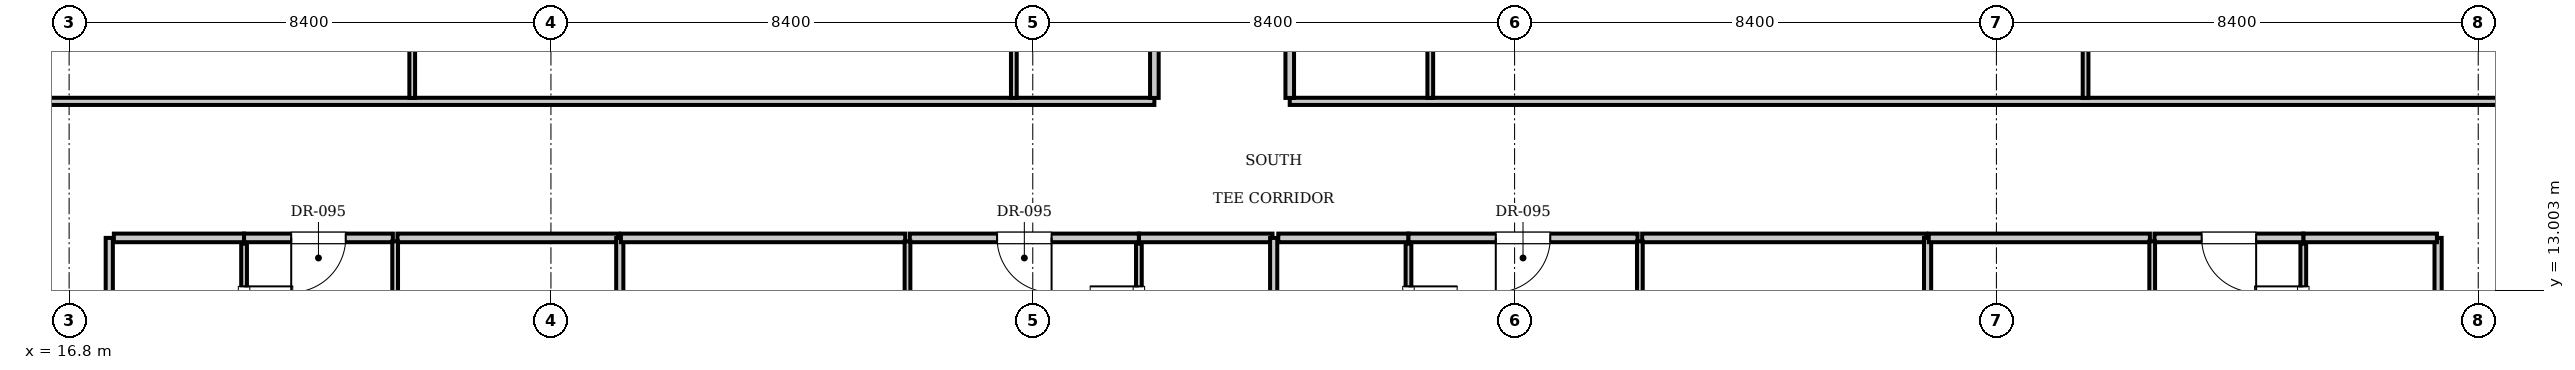
"""IFC4 building model, lengths in metres.
Left out: names, types, materials, properties, quantities, classifications, styles, units other than length and angle.
Written with IfcOpenShell. Run it as: python <this file> out.ifc"""

import sys

from ifc_helpers import new_model, si_unit, direction, frame, frame_2d, origin, place, context, subcontext, project, spatial, rectangle, extrude, element, fill, save


model = new_model("IFC4")
c1 = context("Model", 3, precision=1e-05, world=origin(), true_north=direction((0.0, 1.0)))
c2 = subcontext(c1, "Body", "Model", "MODEL_VIEW")
j1 = project(units=[si_unit("LENGTHUNIT", "METRE"), si_unit("PLANEANGLEUNIT", "RADIAN")], contexts=[c1])
p1 = place(None, origin())
s1 = spatial("IfcSite", under=j1, at=p1, CompositionType="ELEMENT")
p2 = place(p1, origin())
s2 = spatial("IfcBuilding", under=s1, at=p2, CompositionType="ELEMENT")
p3 = place(p2, frame((0.0, 0.0, 189.0)))
s3 = spatial("IfcBuildingStorey", under=s2, at=p3, CompositionType="ELEMENT", Elevation=189.0)
for number, where, z_axis, x_axis in (
    (1, (17.5, 9.0, 0.0), (0.0, 0.0, 1.0), (0.0, 1.0, 0.0)),
    (2, (58.1, 9.0, 0.0), (0.0, 0.0, 1.0), (0.0, 1.0, 0.0)),
):
    element("IfcWall", number, at=place(p3, frame(where, z_axis=z_axis, x_axis=x_axis)), inside=s3, PredefinedType="PARTITIONING", context=c2, shape_type="SweptSolid", body=[
        extrude(rectangle(XDim=4.92, YDim=0.125, at=frame_2d((2.46, 0.0))), origin(), (0.0, 0.0, 1.0), 3.61),
    ])
p4 = place(p3, frame((17.58, 13.92, 0.0), z_axis=(0.0, 0.0, 1.0), x_axis=(1.0, 0.0, 0.0)))
e3 = element("IfcWall", 3, at=p4, inside=s3, PredefinedType="PARTITIONING", context=c2, shape_type="SweptSolid", body=[
    extrude(rectangle(XDim=2.27, YDim=0.15, at=frame_2d((1.135, 0.0))), origin(), (0.0, 0.0, 1.0), 3.61),
])
p5 = place(p3, frame((19.85, 11.48, 0.0), z_axis=(0.0, 0.0, 1.0), x_axis=(0.0, 1.0, 0.0)))
e4 = element("IfcWall", 4, at=p5, inside=s3, PredefinedType="PARTITIONING", context=c2, shape_type="SweptSolid", body=[
    extrude(rectangle(XDim=2.34, YDim=0.1, at=frame_2d((1.17, 0.0))), origin(), (0.0, 0.0, 1.0), 3.61),
])
p6 = place(p5, frame((0.745, 0.0, 0.0)))
e5 = element("IfcOpeningElement", 5, at=p6, cuts=e4, PredefinedType="OPENING", context=c2, shape_type="SweptSolid", body=[
    extrude(rectangle(XDim=0.85, YDim=2.1, at=frame_2d((0.425, 1.05))), frame((0.0, 0.06, 0.0), z_axis=(0.0, -1.0, 0.0), x_axis=(1.0, 0.0, 0.0)), (0.0, 0.0, 1.0), 0.12),
])
p7 = place(p3, frame((19.85, 13.92, 0.0), z_axis=(0.0, 0.0, 1.0), x_axis=(1.0, 0.0, 0.0)))
e6 = element("IfcWall", 6, at=p7, inside=s3, PredefinedType="PARTITIONING", context=c2, shape_type="SweptSolid", body=[
    extrude(rectangle(XDim=2.594, YDim=0.15, at=frame_2d((1.297, 0.0))), origin(), (0.0, 0.0, 1.0), 3.61),
])
p8 = place(p7, frame((0.822, 0.0, 0.0)))
e7 = element("IfcOpeningElement", 7, at=p8, cuts=e6, PredefinedType="OPENING", context=c2, shape_type="SweptSolid", body=[
    extrude(rectangle(XDim=0.95, YDim=2.15, at=frame_2d((0.475, 1.075))), frame((0.0, 0.085, 0.0), z_axis=(0.0, -1.0, 0.0), x_axis=(1.0, 0.0, 0.0)), (0.0, 0.0, 1.0), 0.17),
])
p9 = place(p3, frame((22.524, 13.92, 0.0), z_axis=(0.0, 0.0, 1.0), x_axis=(1.0, 0.0, 0.0)))
e8 = element("IfcWall", 8, at=p9, inside=s3, PredefinedType="PARTITIONING", context=c2, shape_type="SweptSolid", body=[
    extrude(rectangle(XDim=3.856, YDim=0.15, at=frame_2d((1.928, 0.0))), origin(), (0.0, 0.0, 1.0), 3.61),
])
p10 = place(p3, frame((22.484, 4.63, 0.0), z_axis=(0.0, 0.0, 1.0), x_axis=(0.0, 1.0, 0.0)))
e9 = element("IfcWall", 9, at=p10, inside=s3, PredefinedType="PARTITIONING", context=c2, shape_type="SweptSolid", body=[
    extrude(rectangle(XDim=9.23, YDim=0.1, at=frame_2d((4.615, 0.0))), origin(), (0.0, 0.0, 1.0), 3.61),
])
p11 = place(p10, frame((1.6, 0.0, 0.0)))
e10 = element("IfcOpeningElement", 10, at=p11, cuts=e9, PredefinedType="OPENING", context=c2, shape_type="SweptSolid", body=[
    extrude(rectangle(XDim=0.9, YDim=2.1, at=frame_2d((0.45, 1.05))), frame((0.0, 0.06, 0.0), z_axis=(0.0, -1.0, 0.0), x_axis=(1.0, 0.0, 0.0)), (0.0, 0.0, 1.0), 0.12),
])
p12 = place(p3, frame((26.4, 4.7, 0.0), z_axis=(0.0, 0.0, 1.0), x_axis=(0.0, 1.0, 0.0)))
e11 = element("IfcWall", 11, at=p12, inside=s3, PredefinedType="PARTITIONING", context=c2, shape_type="SweptSolid", body=[
    extrude(rectangle(XDim=9.22, YDim=0.125, at=frame_2d((4.61, 0.0))), origin(), (0.0, 0.0, 1.0), 3.61),
])
p13 = place(p3, frame((35.45, 13.92, 0.0), z_axis=(0.0, 0.0, 1.0), x_axis=(1.0, 0.0, 0.0)))
e12 = element("IfcWall", 12, at=p13, inside=s3, PredefinedType="PARTITIONING", context=c2, shape_type="SweptSolid", body=[
    extrude(rectangle(XDim=2.33, YDim=0.15, at=frame_2d((1.165, 0.0))), origin(), (0.0, 0.0, 1.0), 3.61),
])
p14 = place(p3, frame((35.45, 11.48, 0.0), z_axis=(0.0, 0.0, 1.0), x_axis=(0.0, 1.0, 0.0)))
e13 = element("IfcWall", 13, at=p14, inside=s3, PredefinedType="PARTITIONING", context=c2, shape_type="SweptSolid", body=[
    extrude(rectangle(XDim=2.34, YDim=0.1, at=frame_2d((1.17, 0.0))), origin(), (0.0, 0.0, 1.0), 3.61),
])
p15 = place(p14, frame((0.745, 0.0, 0.0)))
e14 = element("IfcOpeningElement", 14, at=p15, cuts=e13, PredefinedType="OPENING", context=c2, shape_type="SweptSolid", body=[
    extrude(rectangle(XDim=0.85, YDim=2.1, at=frame_2d((0.425, 1.05))), frame((0.0, 0.06, 0.0), z_axis=(0.0, -1.0, 0.0), x_axis=(1.0, 0.0, 0.0)), (0.0, 0.0, 1.0), 0.12),
])
p16 = place(p3, frame((26.42, 13.92, 0.0), z_axis=(0.0, 0.0, 1.0), x_axis=(1.0, 0.0, 0.0)))
e15 = element("IfcWall", 15, at=p16, inside=s3, PredefinedType="PARTITIONING", context=c2, shape_type="SweptSolid", body=[
    extrude(rectangle(XDim=4.956, YDim=0.15, at=frame_2d((2.478, 0.0))), origin(), (0.0, 0.0, 1.0), 3.61),
])
p17 = place(p3, frame((31.456, 13.92, 0.0), z_axis=(0.0, 0.0, 1.0), x_axis=(1.0, 0.0, 0.0)))
e16 = element("IfcWall", 16, at=p17, inside=s3, PredefinedType="PARTITIONING", context=c2, shape_type="SweptSolid", body=[
    extrude(rectangle(XDim=3.994, YDim=0.15, at=frame_2d((1.997, 0.0))), origin(), (0.0, 0.0, 1.0), 3.61),
])
p18 = place(p17, frame((1.522, 0.0, 0.0)))
e17 = element("IfcOpeningElement", 17, at=p18, cuts=e16, PredefinedType="OPENING", context=c2, shape_type="SweptSolid", body=[
    extrude(rectangle(XDim=0.95, YDim=2.15, at=frame_2d((0.475, 1.075))), frame((0.0, 0.085, 0.0), z_axis=(0.0, -1.0, 0.0), x_axis=(1.0, 0.0, 0.0)), (0.0, 0.0, 1.0), 0.17),
])
p19 = place(p3, frame((31.416, 4.63, 0.0), z_axis=(0.0, 0.0, 1.0), x_axis=(0.0, 1.0, 0.0)))
e18 = element("IfcWall", 18, at=p19, inside=s3, PredefinedType="PARTITIONING", context=c2, shape_type="SweptSolid", body=[
    extrude(rectangle(XDim=9.23, YDim=0.1, at=frame_2d((4.615, 0.0))), origin(), (0.0, 0.0, 1.0), 3.61),
])
p20 = place(p19, frame((1.6, 0.0, 0.0)))
e19 = element("IfcOpeningElement", 19, at=p20, cuts=e18, PredefinedType="OPENING", context=c2, shape_type="SweptSolid", body=[
    extrude(rectangle(XDim=0.9, YDim=2.1, at=frame_2d((0.45, 1.05))), frame((0.0, 0.06, 0.0), z_axis=(0.0, -1.0, 0.0), x_axis=(1.0, 0.0, 0.0)), (0.0, 0.0, 1.0), 0.12),
])
p21 = place(p3, frame((37.8, 4.7, 0.0), z_axis=(0.0, 0.0, 1.0), x_axis=(0.0, 1.0, 0.0)))
e20 = element("IfcWall", 20, at=p21, inside=s3, PredefinedType="PARTITIONING", context=c2, shape_type="SweptSolid", body=[
    extrude(rectangle(XDim=9.22, YDim=0.125, at=frame_2d((4.61, 0.0))), origin(), (0.0, 0.0, 1.0), 3.293),
])
p22 = place(p3, frame((37.88, 13.92, 0.0), z_axis=(0.0, 0.0, 1.0), x_axis=(1.0, 0.0, 0.0)))
e21 = element("IfcWall", 21, at=p22, inside=s3, PredefinedType="PARTITIONING", context=c2, shape_type="SweptSolid", body=[
    extrude(rectangle(XDim=2.27, YDim=0.15, at=frame_2d((1.135, 0.0))), origin(), (0.0, 0.0, 1.0), 3.61),
])
p23 = place(p3, frame((40.15, 11.48, 0.0), z_axis=(0.0, 0.0, 1.0), x_axis=(0.0, 1.0, 0.0)))
e22 = element("IfcWall", 22, at=p23, inside=s3, PredefinedType="PARTITIONING", context=c2, shape_type="SweptSolid", body=[
    extrude(rectangle(XDim=2.34, YDim=0.1, at=frame_2d((1.17, 0.0))), origin(), (0.0, 0.0, 1.0), 3.61),
])
p24 = place(p23, frame((0.745, 0.0, 0.0)))
e23 = element("IfcOpeningElement", 23, at=p24, cuts=e22, PredefinedType="OPENING", context=c2, shape_type="SweptSolid", body=[
    extrude(rectangle(XDim=0.85, YDim=2.1, at=frame_2d((0.425, 1.05))), frame((0.0, 0.06, 0.0), z_axis=(0.0, -1.0, 0.0), x_axis=(1.0, 0.0, 0.0)), (0.0, 0.0, 1.0), 0.12),
])
p25 = place(p3, frame((40.15, 13.92, 0.0), z_axis=(0.0, 0.0, 1.0), x_axis=(1.0, 0.0, 0.0)))
e24 = element("IfcWall", 24, at=p25, inside=s3, PredefinedType="PARTITIONING", context=c2, shape_type="SweptSolid", body=[
    extrude(rectangle(XDim=3.994, YDim=0.15, at=frame_2d((1.997, 0.0))), origin(), (0.0, 0.0, 1.0), 3.61),
])
p26 = place(p25, frame((1.522, 0.0, 0.0)))
e25 = element("IfcOpeningElement", 25, at=p26, cuts=e24, PredefinedType="OPENING", context=c2, shape_type="SweptSolid", body=[
    extrude(rectangle(XDim=0.95, YDim=2.15, at=frame_2d((0.475, 1.075))), frame((0.0, 0.085, 0.0), z_axis=(0.0, -1.0, 0.0), x_axis=(1.0, 0.0, 0.0)), (0.0, 0.0, 1.0), 0.17),
])
p27 = place(p3, frame((44.224, 13.92, 0.0), z_axis=(0.0, 0.0, 1.0), x_axis=(1.0, 0.0, 0.0)))
e26 = element("IfcWall", 26, at=p27, inside=s3, PredefinedType="PARTITIONING", context=c2, shape_type="SweptSolid", body=[
    extrude(rectangle(XDim=4.956, YDim=0.15, at=frame_2d((2.478, 0.0))), origin(), (0.0, 0.0, 1.0), 3.61),
])
p28 = place(p3, frame((44.184, 4.63, 0.0), z_axis=(0.0, 0.0, 1.0), x_axis=(0.0, 1.0, 0.0)))
e27 = element("IfcWall", 27, at=p28, inside=s3, PredefinedType="PARTITIONING", context=c2, shape_type="SweptSolid", body=[
    extrude(rectangle(XDim=9.23, YDim=0.1, at=frame_2d((4.615, 0.0))), origin(), (0.0, 0.0, 1.0), 3.61),
])
p29 = place(p28, frame((1.6, 0.0, 0.0)))
e28 = element("IfcOpeningElement", 28, at=p29, cuts=e27, PredefinedType="OPENING", context=c2, shape_type="SweptSolid", body=[
    extrude(rectangle(XDim=0.9, YDim=2.1, at=frame_2d((0.45, 1.05))), frame((0.0, 0.06, 0.0), z_axis=(0.0, -1.0, 0.0), x_axis=(1.0, 0.0, 0.0)), (0.0, 0.0, 1.0), 0.12),
])
p30 = place(p3, frame((49.2, 4.7, 0.0), z_axis=(0.0, 0.0, 1.0), x_axis=(0.0, 1.0, 0.0)))
e29 = element("IfcWall", 29, at=p30, inside=s3, PredefinedType="PARTITIONING", context=c2, shape_type="SweptSolid", body=[
    extrude(rectangle(XDim=9.22, YDim=0.125, at=frame_2d((4.61, 0.0))), origin(), (0.0, 0.0, 1.0), 3.61),
])
p31 = place(p3, frame((55.75, 13.92, 0.0), z_axis=(0.0, 0.0, 1.0), x_axis=(1.0, 0.0, 0.0)))
e30 = element("IfcWall", 30, at=p31, inside=s3, PredefinedType="PARTITIONING", context=c2, shape_type="SweptSolid", body=[
    extrude(rectangle(XDim=2.33, YDim=0.15, at=frame_2d((1.165, 0.0))), origin(), (0.0, 0.0, 1.0), 3.61),
])
p32 = place(p3, frame((55.75, 11.48, 0.0), z_axis=(0.0, 0.0, 1.0), x_axis=(0.0, 1.0, 0.0)))
e31 = element("IfcWall", 31, at=p32, inside=s3, PredefinedType="PARTITIONING", context=c2, shape_type="SweptSolid", body=[
    extrude(rectangle(XDim=2.34, YDim=0.1, at=frame_2d((1.17, 0.0))), origin(), (0.0, 0.0, 1.0), 3.61),
])
p33 = place(p32, frame((0.745, 0.0, 0.0)))
e32 = element("IfcOpeningElement", 32, at=p33, cuts=e31, PredefinedType="OPENING", context=c2, shape_type="SweptSolid", body=[
    extrude(rectangle(XDim=0.85, YDim=2.1, at=frame_2d((0.425, 1.05))), frame((0.0, 0.06, 0.0), z_axis=(0.0, -1.0, 0.0), x_axis=(1.0, 0.0, 0.0)), (0.0, 0.0, 1.0), 0.12),
])
p34 = place(p3, frame((49.22, 13.92, 0.0), z_axis=(0.0, 0.0, 1.0), x_axis=(1.0, 0.0, 0.0)))
e33 = element("IfcWall", 33, at=p34, inside=s3, PredefinedType="PARTITIONING", context=c2, shape_type="SweptSolid", body=[
    extrude(rectangle(XDim=3.856, YDim=0.15, at=frame_2d((1.928, 0.0))), origin(), (0.0, 0.0, 1.0), 3.61),
])
p35 = place(p3, frame((53.156, 13.92, 0.0), z_axis=(0.0, 0.0, 1.0), x_axis=(1.0, 0.0, 0.0)))
e34 = element("IfcWall", 34, at=p35, inside=s3, PredefinedType="PARTITIONING", context=c2, shape_type="SweptSolid", body=[
    extrude(rectangle(XDim=2.594, YDim=0.15, at=frame_2d((1.297, 0.0))), origin(), (0.0, 0.0, 1.0), 3.61),
])
p36 = place(p35, frame((0.822, 0.0, 0.0)))
e35 = element("IfcOpeningElement", 35, at=p36, cuts=e34, PredefinedType="OPENING", context=c2, shape_type="SweptSolid", body=[
    extrude(rectangle(XDim=0.95, YDim=2.15, at=frame_2d((0.475, 1.075))), frame((0.0, 0.085, 0.0), z_axis=(0.0, -1.0, 0.0), x_axis=(1.0, 0.0, 0.0)), (0.0, 0.0, 1.0), 0.17),
])
p37 = place(p3, frame((53.116, 4.63, 0.0), z_axis=(0.0, 0.0, 1.0), x_axis=(0.0, 1.0, 0.0)))
e36 = element("IfcWall", 36, at=p37, inside=s3, PredefinedType="PARTITIONING", context=c2, shape_type="SweptSolid", body=[
    extrude(rectangle(XDim=9.23, YDim=0.1, at=frame_2d((4.615, 0.0))), origin(), (0.0, 0.0, 1.0), 3.61),
])
p38 = place(p37, frame((1.6, 0.0, 0.0)))
e37 = element("IfcOpeningElement", 37, at=p38, cuts=e36, PredefinedType="OPENING", context=c2, shape_type="SweptSolid", body=[
    extrude(rectangle(XDim=0.9, YDim=2.1, at=frame_2d((0.45, 1.05))), frame((0.0, 0.06, 0.0), z_axis=(0.0, -1.0, 0.0), x_axis=(1.0, 0.0, 0.0)), (0.0, 0.0, 1.0), 0.12),
])
p39 = place(p3, frame((13.2, 16.3, 0.0), z_axis=(0.0, 0.0, 1.0), x_axis=(1.0, 0.0, 0.0)))
e38 = element("IfcWall", 38, at=p39, inside=s3, PredefinedType="PARTITIONING", context=c2, shape_type="SweptSolid", body=[
    extrude(rectangle(XDim=22.52, YDim=0.125, at=frame_2d((11.26, 0.0))), origin(), (0.0, 0.0, 1.0), 3.61),
])
p40 = place(p3, frame((38.08, 16.3, 0.0), z_axis=(0.0, 0.0, 1.0), x_axis=(1.0, 0.0, 0.0)))
e39 = element("IfcWall", 39, at=p40, inside=s3, PredefinedType="PARTITIONING", context=c2, shape_type="SweptSolid", body=[
    extrude(rectangle(XDim=24.32, YDim=0.125, at=frame_2d((12.16, 0.0))), origin(), (0.0, 0.0, 1.0), 3.61),
])
p41 = place(p3, frame((35.72, 16.36, 0.0), z_axis=(0.0, 0.0, 1.0), x_axis=(0.0, 1.0, 0.0)))
e40 = element("IfcWall", 40, at=p41, inside=s3, PredefinedType="PARTITIONING", context=c2, shape_type="SweptSolid", body=[
    extrude(rectangle(XDim=1.89, YDim=0.15, at=frame_2d((0.945, 0.0))), origin(), (0.0, 0.0, 1.0), 3.61),
])
p42 = place(p3, frame((33.27, 16.36, 0.0), z_axis=(0.0, 0.0, 1.0), x_axis=(0.0, 1.0, 0.0)))
e41 = element("IfcWall", 41, at=p42, inside=s3, PredefinedType="PARTITIONING", context=c2, shape_type="SweptSolid", body=[
    extrude(rectangle(XDim=1.89, YDim=0.1, at=frame_2d((0.945, 0.0))), origin(), (0.0, 0.0, 1.0), 3.61),
])
p43 = place(p3, frame((22.781, 16.36, 0.0), z_axis=(0.0, 0.0, 1.0), x_axis=(0.0, 1.0, 0.0)))
e42 = element("IfcWall", 42, at=p43, inside=s3, PredefinedType="PARTITIONING", context=c2, shape_type="SweptSolid", body=[
    extrude(rectangle(XDim=3.58, YDim=0.1, at=frame_2d((1.79, 0.0))), origin(), (0.0, 0.0, 1.0), 3.61),
])
p44 = place(p43, frame((1.34, 0.0, 0.0)))
e43 = element("IfcOpeningElement", 43, at=p44, cuts=e42, PredefinedType="OPENING", context=c2, shape_type="SweptSolid", body=[
    extrude(rectangle(XDim=0.9, YDim=2.1, at=frame_2d((0.45, 1.05))), frame((0.0, 0.06, 0.0), z_axis=(0.0, -1.0, 0.0), x_axis=(1.0, 0.0, 0.0)), (0.0, 0.0, 1.0), 0.12),
])
p45 = place(p3, frame((38.08, 16.36, 0.0), z_axis=(0.0, 0.0, 1.0), x_axis=(0.0, 1.0, 0.0)))
e44 = element("IfcWall", 44, at=p45, inside=s3, PredefinedType="PARTITIONING", context=c2, shape_type="SweptSolid", body=[
    extrude(rectangle(XDim=1.89, YDim=0.15, at=frame_2d((0.945, 0.0))), origin(), (0.0, 0.0, 1.0), 3.61),
])
p46 = place(p3, frame((40.53, 16.36, 0.0), z_axis=(0.0, 0.0, 1.0), x_axis=(0.0, 1.0, 0.0)))
e45 = element("IfcWall", 45, at=p46, inside=s3, PredefinedType="PARTITIONING", context=c2, shape_type="SweptSolid", body=[
    extrude(rectangle(XDim=1.89, YDim=0.1, at=frame_2d((0.945, 0.0))), origin(), (0.0, 0.0, 1.0), 3.61),
])
p47 = place(p3, frame((51.954, 16.36, 0.0), z_axis=(0.0, 0.0, 1.0), x_axis=(0.0, 1.0, 0.0)))
e46 = element("IfcWall", 46, at=p47, inside=s3, PredefinedType="PARTITIONING", context=c2, shape_type="SweptSolid", body=[
    extrude(rectangle(XDim=3.58, YDim=0.1, at=frame_2d((1.79, 0.0))), origin(), (0.0, 0.0, 1.0), 3.61),
])
p48 = place(p47, frame((2.42, 0.0, 0.0)))
e47 = element("IfcOpeningElement", 47, at=p48, cuts=e46, PredefinedType="OPENING", context=c2, shape_type="SweptSolid", body=[
    extrude(rectangle(XDim=0.9, YDim=2.1, at=frame_2d((0.45, 1.05))), frame((0.0, 0.06, 0.0), z_axis=(0.0, -1.0, 0.0), x_axis=(1.0, 0.0, 0.0)), (0.0, 0.0, 1.0), 0.12),
])
p49 = place(p6, frame((0.85, 0.0, 0.0), z_axis=(0.0, 0.0, 1.0), x_axis=(-1.0, 0.0, 0.0)))
e48 = element("IfcDoor", 48, at=p49, inside=s3, OperationType="SINGLE_SWING_LEFT", PredefinedType="DOOR", context=c2, shape_type="SweptSolid", body=[
    extrude(rectangle(XDim=0.85, YDim=2.1, at=frame_2d((0.425, 1.05))), frame((0.0, 0.025, 0.0), z_axis=(0.0, -1.0, 0.0), x_axis=(1.0, 0.0, 0.0)), (0.0, 0.0, 1.0), 0.05),
])
fill(e5, e48)
p50 = place(p8, frame((0.95, 0.0, 0.0), z_axis=(0.0, 0.0, 1.0), x_axis=(-1.0, 0.0, 0.0)))
e49 = element("IfcDoor", 49, at=p50, inside=s3, OperationType="SINGLE_SWING_RIGHT", PredefinedType="DOOR", context=c2, shape_type="SweptSolid", body=[
    extrude(rectangle(XDim=0.95, YDim=2.15, at=frame_2d((0.475, 1.075))), frame((0.0, 0.025, 0.0), z_axis=(0.0, -1.0, 0.0), x_axis=(1.0, 0.0, 0.0)), (0.0, 0.0, 1.0), 0.05),
])
fill(e7, e49)
p51 = place(p15, origin())
e50 = element("IfcDoor", 50, at=p51, inside=s3, OperationType="SINGLE_SWING_RIGHT", PredefinedType="DOOR", context=c2, shape_type="SweptSolid", body=[
    extrude(rectangle(XDim=0.85, YDim=2.1, at=frame_2d((0.425, 1.05))), frame((0.0, 0.025, 0.0), z_axis=(0.0, -1.0, 0.0), x_axis=(1.0, 0.0, 0.0)), (0.0, 0.0, 1.0), 0.05),
])
fill(e14, e50)
p52 = place(p18, frame((0.95, 0.0, 0.0), z_axis=(0.0, 0.0, 1.0), x_axis=(-1.0, 0.0, 0.0)))
e51 = element("IfcDoor", 51, at=p52, inside=s3, OperationType="SINGLE_SWING_LEFT", PredefinedType="DOOR", context=c2, shape_type="SweptSolid", body=[
    extrude(rectangle(XDim=0.95, YDim=2.15, at=frame_2d((0.475, 1.075))), frame((0.0, 0.025, 0.0), z_axis=(0.0, -1.0, 0.0), x_axis=(1.0, 0.0, 0.0)), (0.0, 0.0, 1.0), 0.05),
])
fill(e17, e51)
p53 = place(p24, frame((0.85, 0.0, 0.0), z_axis=(0.0, 0.0, 1.0), x_axis=(-1.0, 0.0, 0.0)))
e52 = element("IfcDoor", 52, at=p53, inside=s3, OperationType="SINGLE_SWING_LEFT", PredefinedType="DOOR", context=c2, shape_type="SweptSolid", body=[
    extrude(rectangle(XDim=0.85, YDim=2.1, at=frame_2d((0.425, 1.05))), frame((0.0, 0.025, 0.0), z_axis=(0.0, -1.0, 0.0), x_axis=(1.0, 0.0, 0.0)), (0.0, 0.0, 1.0), 0.05),
])
fill(e23, e52)
p54 = place(p26, frame((0.95, 0.0, 0.0), z_axis=(0.0, 0.0, 1.0), x_axis=(-1.0, 0.0, 0.0)))
e53 = element("IfcDoor", 53, at=p54, inside=s3, OperationType="SINGLE_SWING_RIGHT", PredefinedType="DOOR", context=c2, shape_type="SweptSolid", body=[
    extrude(rectangle(XDim=0.95, YDim=2.15, at=frame_2d((0.475, 1.075))), frame((0.0, 0.025, 0.0), z_axis=(0.0, -1.0, 0.0), x_axis=(1.0, 0.0, 0.0)), (0.0, 0.0, 1.0), 0.05),
])
fill(e25, e53)
p55 = place(p33, origin())
e54 = element("IfcDoor", 54, at=p55, inside=s3, OperationType="SINGLE_SWING_RIGHT", PredefinedType="DOOR", context=c2, shape_type="SweptSolid", body=[
    extrude(rectangle(XDim=0.85, YDim=2.1, at=frame_2d((0.425, 1.05))), frame((0.0, 0.025, 0.0), z_axis=(0.0, -1.0, 0.0), x_axis=(1.0, 0.0, 0.0)), (0.0, 0.0, 1.0), 0.05),
])
fill(e32, e54)
p56 = place(p36, frame((0.95, 0.0, 0.0), z_axis=(0.0, 0.0, 1.0), x_axis=(-1.0, 0.0, 0.0)))
e55 = element("IfcDoor", 55, at=p56, inside=s3, OperationType="SINGLE_SWING_LEFT", PredefinedType="DOOR", context=c2, shape_type="SweptSolid", body=[
    extrude(rectangle(XDim=0.95, YDim=2.15, at=frame_2d((0.475, 1.075))), frame((0.0, 0.025, 0.0), z_axis=(0.0, -1.0, 0.0), x_axis=(1.0, 0.0, 0.0)), (0.0, 0.0, 1.0), 0.05),
])
fill(e35, e55)
save(model, sys.argv[1])
